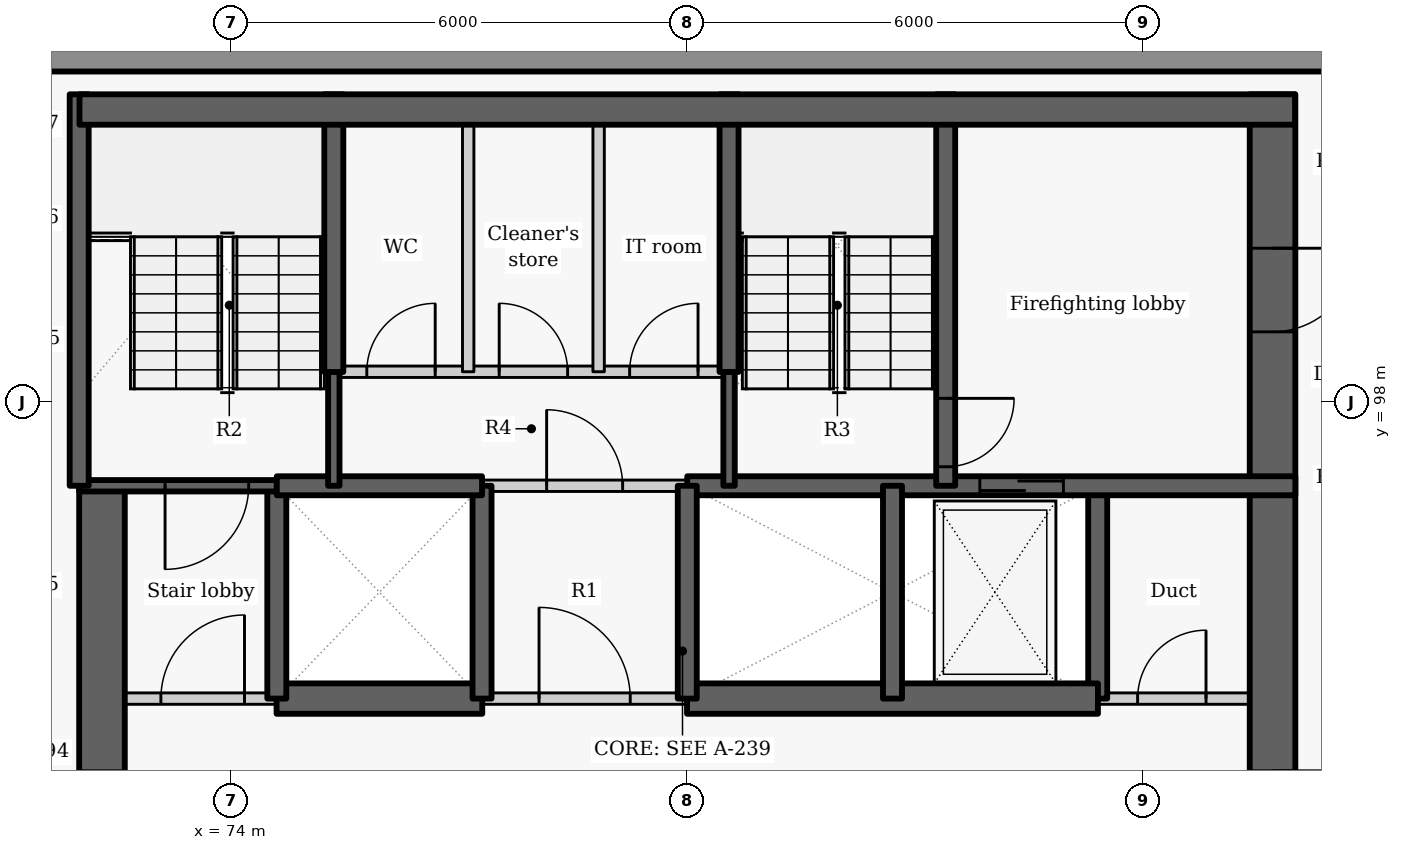
"""IFC4 building model, lengths in metres.
Left out: names, types, materials, properties, quantities, classifications, styles, units other than length and angle.
Written with IfcOpenShell. Run it as: python <this file> out.ifc"""

import sys

from ifc_helpers import new_model, si_unit, direction, frame, frame_2d, origin, place, context, subcontext, project, spatial, rectangle, extrude, element, fill, save


model = new_model("IFC4")
c1 = context("Model", 3, precision=1e-05, world=origin(), true_north=direction((0.0, 1.0)))
c2 = subcontext(c1, "Body", "Model", "MODEL_VIEW")
j1 = project(units=[si_unit("LENGTHUNIT", "METRE"), si_unit("PLANEANGLEUNIT", "RADIAN")], contexts=[c1])
p1 = place(None, origin())
s1 = spatial("IfcSite", under=j1, at=p1, CompositionType="ELEMENT")
p2 = place(p1, origin())
s2 = spatial("IfcBuilding", under=s1, at=p2, CompositionType="ELEMENT")
p3 = place(p2, frame((0.0, 0.0, 226.2)))
s3 = spatial("IfcBuildingStorey", under=s2, at=p3, CompositionType="ELEMENT", Elevation=226.2)
p4 = place(p3, frame((89.499, 102.5, 0.0), z_axis=(0.0, 0.0, 1.0), x_axis=(-1.0, 0.0, 0.0)))
e1 = element("IfcWall", 1, at=p4, inside=s3, PredefinedType="SOLIDWALL", context=c2, shape_type="SweptSolid", body=[
    extrude(rectangle(XDim=19.033, YDim=0.3, at=frame_2d((9.517, 0.0))), origin(), (0.0, 0.0, 1.0), 2.425),
])
p5 = place(p3, frame((72.3, 87.8, -0.41), z_axis=(0.0, 0.0, 1.0), x_axis=(0.0, 1.0, 0.0)))
e2 = element("IfcWall", 2, at=p5, inside=s3, PredefinedType="SHEAR", context=c2, shape_type="SweptSolid", body=[
    extrude(rectangle(XDim=9.1, YDim=0.6, at=frame_2d((4.55, 0.0))), origin(), (0.0, 0.0, 1.0), 3.435),
])
p6 = place(p5, frame((3.85, 0.0, 0.41)))
e3 = element("IfcOpeningElement", 3, at=p6, cuts=e2, PredefinedType="OPENING", context=c2, shape_type="SweptSolid", body=[
    extrude(rectangle(XDim=1.5, YDim=2.1, at=frame_2d((0.75, 1.05))), frame((0.0, 0.31, 0.0), z_axis=(0.0, -1.0, 0.0), x_axis=(1.0, 0.0, 0.0)), (0.0, 0.0, 1.0), 0.62),
])
p7 = place(p3, frame((85.4, 94.1, -0.41), z_axis=(0.0, 0.0, 1.0), x_axis=(0.0, 1.0, 0.0)))
e4 = element("IfcWall", 4, at=p7, inside=s3, PredefinedType="SHEAR", context=c2, shape_type="SweptSolid", body=[
    extrude(rectangle(XDim=2.8, YDim=0.25, at=frame_2d((1.4, 0.0))), origin(), (0.0, 0.0, 1.0), 3.435),
])
p8 = place(p3, frame((87.7, 102.05, -0.41), z_axis=(0.0, 0.0, 1.0), x_axis=(0.0, -1.0, 0.0)))
e5 = element("IfcWall", 5, at=p8, inside=s3, PredefinedType="SHEAR", context=c2, shape_type="SweptSolid", body=[
    extrude(rectangle(XDim=14.25, YDim=0.6, at=frame_2d((7.125, 0.0))), origin(), (0.0, 0.0, 1.0), 3.435),
])
p9 = place(p8, frame((8.9, 0.0, 0.41)))
e6 = element("IfcOpeningElement", 6, at=p9, cuts=e5, PredefinedType="OPENING", context=c2, shape_type="SweptSolid", body=[
    extrude(rectangle(XDim=1.5, YDim=2.1, at=frame_2d((0.75, 1.05))), frame((0.0, 0.31, 0.0), z_axis=(0.0, -1.0, 0.0), x_axis=(1.0, 0.0, 0.0)), (0.0, 0.0, 1.0), 0.62),
])
p10 = place(p8, frame((2.025, 0.0, 0.41)))
e7 = element("IfcOpeningElement", 7, at=p10, cuts=e5, PredefinedType="OPENING", context=c2, shape_type="SweptSolid", body=[
    extrude(rectangle(XDim=1.1, YDim=2.1, at=frame_2d((0.55, 1.05))), frame((0.0, 0.31, 0.0), z_axis=(0.0, -1.0, 0.0), x_axis=(1.0, 0.0, 0.0)), (0.0, 0.0, 1.0), 0.62),
])
p11 = place(p3, frame((72.0, 94.1, 0.0), z_axis=(0.0, 0.0, 1.0), x_axis=(1.0, 0.0, 0.0)))
e8 = element("IfcWall", 8, at=p11, inside=s3, PredefinedType="PARTITIONING", context=c2, shape_type="SweptSolid", body=[
    extrude(rectangle(XDim=2.603, YDim=0.15, at=frame_2d((1.302, 0.0))), origin(), (0.0, 0.0, 1.0), 3.025),
])
p12 = place(p11, frame((1.075, 0.0, 0.0)))
e9 = element("IfcOpeningElement", 9, at=p12, cuts=e8, PredefinedType="OPENING", context=c2, shape_type="SweptSolid", body=[
    extrude(rectangle(XDim=1.1, YDim=2.1, at=frame_2d((0.55, 1.05))), frame((0.0, 0.085, 0.0), z_axis=(0.0, -1.0, 0.0), x_axis=(1.0, 0.0, 0.0)), (0.0, 0.0, 1.0), 0.17),
])
p13 = place(p3, frame((77.297, 94.1, 0.0), z_axis=(0.0, 0.0, 1.0), x_axis=(1.0, 0.0, 0.0)))
e10 = element("IfcWall", 10, at=p13, inside=s3, PredefinedType="PARTITIONING", context=c2, shape_type="SweptSolid", body=[
    extrude(rectangle(XDim=2.706, YDim=0.15, at=frame_2d((1.353, 0.0))), origin(), (0.0, 0.0, 1.0), 3.025),
])
p14 = place(p13, frame((0.753, 0.0, 0.0)))
e11 = element("IfcOpeningElement", 11, at=p14, cuts=e10, PredefinedType="OPENING", context=c2, shape_type="SweptSolid", body=[
    extrude(rectangle(XDim=1.2, YDim=2.1, at=frame_2d((0.6, 1.05))), frame((0.0, 0.085, 0.0), z_axis=(0.0, -1.0, 0.0), x_axis=(1.0, 0.0, 0.0)), (0.0, 0.0, 1.0), 0.17),
])
p15 = place(p3, frame((85.397, 94.1, 0.0), z_axis=(0.0, 0.0, 1.0), x_axis=(1.0, 0.0, 0.0)))
e12 = element("IfcWall", 12, at=p15, inside=s3, PredefinedType="PARTITIONING", context=c2, shape_type="SweptSolid", body=[
    extrude(rectangle(XDim=2.603, YDim=0.15, at=frame_2d((1.302, 0.0))), origin(), (0.0, 0.0, 1.0), 3.025),
])
p16 = place(p15, frame((0.528, 0.0, 0.0)))
e13 = element("IfcOpeningElement", 13, at=p16, cuts=e12, PredefinedType="OPENING", context=c2, shape_type="SweptSolid", body=[
    extrude(rectangle(XDim=0.9, YDim=2.1, at=frame_2d((0.45, 1.05))), frame((0.0, 0.085, 0.0), z_axis=(0.0, -1.0, 0.0), x_axis=(1.0, 0.0, 0.0)), (0.0, 0.0, 1.0), 0.17),
])
p17 = place(p3, frame((74.597, 94.1, -0.41), z_axis=(0.0, 0.0, 1.0), x_axis=(1.0, 0.0, 0.0)))
e14 = element("IfcWall", 14, at=p17, inside=s3, PredefinedType="SHEAR", context=c2, shape_type="SweptSolid", body=[
    extrude(rectangle(XDim=2.706, YDim=0.4, at=frame_2d((1.353, 0.0))), origin(), (0.0, 0.0, 1.0), 3.435),
])
p18 = place(p3, frame((79.997, 94.1, -0.41), z_axis=(0.0, 0.0, 1.0), x_axis=(1.0, 0.0, 0.0)))
e15 = element("IfcWall", 15, at=p18, inside=s3, PredefinedType="SHEAR", context=c2, shape_type="SweptSolid", body=[
    extrude(rectangle(XDim=5.406, YDim=0.4, at=frame_2d((2.703, 0.0))), origin(), (0.0, 0.0, 1.0), 3.435),
])
p19 = place(p3, frame((74.6, 94.1, -0.41), z_axis=(0.0, 0.0, 1.0), x_axis=(0.0, 1.0, 0.0)))
e16 = element("IfcWall", 16, at=p19, inside=s3, PredefinedType="SHEAR", context=c2, shape_type="SweptSolid", body=[
    extrude(rectangle(XDim=2.8, YDim=0.25, at=frame_2d((1.4, 0.0))), origin(), (0.0, 0.0, 1.0), 3.435),
])
p20 = place(p3, frame((74.6, 96.9, -0.41), z_axis=(0.0, 0.0, 1.0), x_axis=(-1.0, 0.0, 0.0)))
e17 = element("IfcWall", 17, at=p20, inside=s3, PredefinedType="SHEAR", context=c2, shape_type="SweptSolid", body=[
    extrude(rectangle(XDim=2.6, YDim=0.15, at=frame_2d((1.3, 0.0))), origin(), (0.0, 0.0, 1.0), 3.435),
])
p21 = place(p20, frame((0.37, 0.0, 0.41)))
e18 = element("IfcOpeningElement", 18, at=p21, cuts=e17, PredefinedType="OPENING", context=c2, shape_type="SweptSolid", body=[
    extrude(rectangle(XDim=1.1, YDim=2.1, at=frame_2d((0.55, 1.05))), frame((0.0, 0.085, 0.0), z_axis=(0.0, -1.0, 0.0), x_axis=(1.0, 0.0, 0.0)), (0.0, 0.0, 1.0), 0.17),
])
p22 = place(p3, frame((77.3, 94.1, -0.41), z_axis=(0.0, 0.0, 1.0), x_axis=(0.0, 1.0, 0.0)))
e19 = element("IfcWall", 19, at=p22, inside=s3, PredefinedType="SHEAR", context=c2, shape_type="SweptSolid", body=[
    extrude(rectangle(XDim=2.8, YDim=0.25, at=frame_2d((1.4, 0.0))), origin(), (0.0, 0.0, 1.0), 3.435),
])
p23 = place(p3, frame((74.6, 96.9, -0.41), z_axis=(0.0, 0.0, 1.0), x_axis=(1.0, 0.0, 0.0)))
e20 = element("IfcWall", 20, at=p23, inside=s3, PredefinedType="SHEAR", context=c2, shape_type="SweptSolid", body=[
    extrude(rectangle(XDim=2.7, YDim=0.25, at=frame_2d((1.35, 0.0))), origin(), (0.0, 0.0, 1.0), 3.435),
])
p24 = place(p3, frame((80.0, 96.9, -0.41), z_axis=(0.0, 0.0, 1.0), x_axis=(1.0, 0.0, 0.0)))
e21 = element("IfcWall", 21, at=p24, inside=s3, PredefinedType="SHEAR", context=c2, shape_type="SweptSolid", body=[
    extrude(rectangle(XDim=8.0, YDim=0.25, at=frame_2d((4.0, 0.0))), origin(), (0.0, 0.0, 1.0), 3.435),
])
p25 = place(p24, frame((3.849, 0.0, 0.41)))
e22 = element("IfcOpeningElement", 22, at=p25, cuts=e21, PredefinedType="OPENING", context=c2, shape_type="SweptSolid", body=[
    extrude(rectangle(XDim=1.1, YDim=2.1, at=frame_2d((0.55, 1.05))), frame((0.0, 0.135, 0.0), z_axis=(0.0, -1.0, 0.0), x_axis=(1.0, 0.0, 0.0)), (0.0, 0.0, 1.0), 0.27),
])
p26 = place(p3, frame((80.0, 94.1, -0.41), z_axis=(0.0, 0.0, 1.0), x_axis=(0.0, 1.0, 0.0)))
e23 = element("IfcWall", 23, at=p26, inside=s3, PredefinedType="SHEAR", context=c2, shape_type="SweptSolid", body=[
    extrude(rectangle(XDim=2.8, YDim=0.25, at=frame_2d((1.4, 0.0))), origin(), (0.0, 0.0, 1.0), 3.435),
])
p27 = place(p3, frame((77.3, 96.9, 0.0), z_axis=(0.0, 0.0, 1.0), x_axis=(1.0, 0.0, 0.0)))
e24 = element("IfcWall", 24, at=p27, inside=s3, PredefinedType="PARTITIONING", context=c2, shape_type="SweptSolid", body=[
    extrude(rectangle(XDim=2.7, YDim=0.15, at=frame_2d((1.35, 0.0))), origin(), (0.0, 0.0, 1.0), 3.025),
])
p28 = place(p27, frame((0.85, 0.0, 0.0)))
e25 = element("IfcOpeningElement", 25, at=p28, cuts=e24, PredefinedType="OPENING", context=c2, shape_type="SweptSolid", body=[
    extrude(rectangle(XDim=1.0, YDim=2.1, at=frame_2d((0.5, 1.05))), frame((0.0, 0.085, 0.0), z_axis=(0.0, -1.0, 0.0), x_axis=(1.0, 0.0, 0.0)), (0.0, 0.0, 1.0), 0.17),
])
p29 = place(p3, frame((82.7, 94.1, -0.41), z_axis=(0.0, 0.0, 1.0), x_axis=(0.0, 1.0, 0.0)))
e26 = element("IfcWall", 26, at=p29, inside=s3, PredefinedType="SHEAR", context=c2, shape_type="SweptSolid", body=[
    extrude(rectangle(XDim=2.8, YDim=0.25, at=frame_2d((1.4, 0.0))), origin(), (0.0, 0.0, 1.0), 3.435),
])
p30 = place(p3, frame((75.35, 96.9, -0.41), z_axis=(0.0, 0.0, 1.0), x_axis=(0.0, 1.0, 0.0)))
e27 = element("IfcWall", 27, at=p30, inside=s3, PredefinedType="SHEAR", context=c2, shape_type="SweptSolid", body=[
    extrude(rectangle(XDim=1.503, YDim=0.15, at=frame_2d((0.751, 0.0))), origin(), (0.0, 0.0, 1.0), 3.435),
])
p31 = place(p3, frame((75.35, 98.397, -0.41), z_axis=(0.0, 0.0, 1.0), x_axis=(0.0, 1.0, 0.0)))
e28 = element("IfcWall", 28, at=p31, inside=s3, PredefinedType="SHEAR", context=c2, shape_type="SweptSolid", body=[
    extrude(rectangle(XDim=3.653, YDim=0.25, at=frame_2d((1.827, 0.0))), origin(), (0.0, 0.0, 1.0), 3.435),
])
p32 = place(p3, frame((72.0, 96.9, -0.41), z_axis=(0.0, 0.0, 1.0), x_axis=(0.0, 1.0, 0.0)))
e29 = element("IfcWall", 29, at=p32, inside=s3, PredefinedType="SHEAR", context=c2, shape_type="SweptSolid", body=[
    extrude(rectangle(XDim=5.15, YDim=0.25, at=frame_2d((2.575, 0.0))), origin(), (0.0, 0.0, 1.0), 3.435),
])
p33 = place(p3, frame((83.4, 102.05, -0.41), z_axis=(0.0, 0.0, 1.0), x_axis=(0.0, -1.0, 0.0)))
e30 = element("IfcWall", 30, at=p33, inside=s3, PredefinedType="SHEAR", context=c2, shape_type="SweptSolid", body=[
    extrude(rectangle(XDim=5.15, YDim=0.25, at=frame_2d((2.575, 0.0))), origin(), (0.0, 0.0, 1.0), 3.435),
])
p34 = place(p33, frame((4.0, 0.0, 0.41)))
e31 = element("IfcOpeningElement", 31, at=p34, cuts=e30, PredefinedType="OPENING", context=c2, shape_type="SweptSolid", body=[
    extrude(rectangle(XDim=0.9, YDim=2.1, at=frame_2d((0.45, 1.05))), frame((0.0, 0.135, 0.0), z_axis=(0.0, -1.0, 0.0), x_axis=(1.0, 0.0, 0.0)), (0.0, 0.0, 1.0), 0.27),
])
p35 = place(p3, frame((80.55, 96.9, -0.41), z_axis=(0.0, 0.0, 1.0), x_axis=(0.0, 1.0, 0.0)))
e32 = element("IfcWall", 32, at=p35, inside=s3, PredefinedType="SHEAR", context=c2, shape_type="SweptSolid", body=[
    extrude(rectangle(XDim=1.503, YDim=0.15, at=frame_2d((0.751, 0.0))), origin(), (0.0, 0.0, 1.0), 3.435),
])
p36 = place(p3, frame((80.55, 98.397, -0.41), z_axis=(0.0, 0.0, 1.0), x_axis=(0.0, 1.0, 0.0)))
e33 = element("IfcWall", 33, at=p36, inside=s3, PredefinedType="SHEAR", context=c2, shape_type="SweptSolid", body=[
    extrude(rectangle(XDim=3.653, YDim=0.25, at=frame_2d((1.827, 0.0))), origin(), (0.0, 0.0, 1.0), 3.435),
])
p37 = place(p3, frame((75.35, 98.4, 0.0), z_axis=(0.0, 0.0, 1.0), x_axis=(1.0, 0.0, 0.0)))
e34 = element("IfcWall", 34, at=p37, inside=s3, PredefinedType="PARTITIONING", context=c2, shape_type="SweptSolid", body=[
    extrude(rectangle(XDim=5.2, YDim=0.15, at=frame_2d((2.6, 0.0))), origin(), (0.0, 0.0, 1.0), 3.025),
])
p38 = place(p37, frame((0.434, 0.0, 0.0)))
e35 = element("IfcOpeningElement", 35, at=p38, cuts=e34, PredefinedType="OPENING", context=c2, shape_type="SweptSolid", body=[
    extrude(rectangle(XDim=0.9, YDim=2.1, at=frame_2d((0.45, 1.05))), frame((0.0, 0.085, 0.0), z_axis=(0.0, -1.0, 0.0), x_axis=(1.0, 0.0, 0.0)), (0.0, 0.0, 1.0), 0.17),
])
p39 = place(p37, frame((2.176, 0.0, 0.0)))
e36 = element("IfcOpeningElement", 36, at=p39, cuts=e34, PredefinedType="OPENING", context=c2, shape_type="SweptSolid", body=[
    extrude(rectangle(XDim=0.9, YDim=2.1, at=frame_2d((0.45, 1.05))), frame((0.0, 0.085, 0.0), z_axis=(0.0, -1.0, 0.0), x_axis=(1.0, 0.0, 0.0)), (0.0, 0.0, 1.0), 0.17),
])
p40 = place(p37, frame((3.892, 0.0, 0.0)))
e37 = element("IfcOpeningElement", 37, at=p40, cuts=e34, PredefinedType="OPENING", context=c2, shape_type="SweptSolid", body=[
    extrude(rectangle(XDim=0.9, YDim=2.1, at=frame_2d((0.45, 1.05))), frame((0.0, 0.085, 0.0), z_axis=(0.0, -1.0, 0.0), x_axis=(1.0, 0.0, 0.0)), (0.0, 0.0, 1.0), 0.17),
])
for number, where, z_axis, x_axis in (
    (38, (77.118, 98.4, 0.0), (0.0, 0.0, 1.0), (0.0, 1.0, 0.0)),
    (39, (78.834, 98.4, 0.0), (0.0, 0.0, 1.0), (0.0, 1.0, 0.0)),
):
    element("IfcWall", number, at=place(p3, frame(where, z_axis=z_axis, x_axis=x_axis)), inside=s3, PredefinedType="PARTITIONING", context=c2, shape_type="SweptSolid", body=[
        extrude(rectangle(XDim=3.65, YDim=0.15, at=frame_2d((1.825, 0.0))), origin(), (0.0, 0.0, 1.0), 3.025),
    ])
p41 = place(p3, frame((72.004, 101.85, -0.41), z_axis=(0.0, 0.0, 1.0), x_axis=(1.0, 0.0, 0.0)))
e40 = element("IfcWall", 40, at=p41, inside=s3, PredefinedType="SHEAR", context=c2, shape_type="SweptSolid", body=[
    extrude(rectangle(XDim=15.992, YDim=0.4, at=frame_2d((7.996, 0.0))), origin(), (0.0, 0.0, 1.0), 3.435),
])
p42 = place(p12, origin())
e41 = element("IfcDoor", 41, at=p42, inside=s3, OperationType="SINGLE_SWING_RIGHT", PredefinedType="DOOR", context=c2, shape_type="SweptSolid", body=[
    extrude(rectangle(XDim=1.1, YDim=2.1, at=frame_2d((0.55, 1.05))), frame((0.0, 0.025, 0.0), z_axis=(0.0, -1.0, 0.0), x_axis=(1.0, 0.0, 0.0)), (0.0, 0.0, 1.0), 0.05),
])
fill(e9, e41)
p43 = place(p14, origin())
e42 = element("IfcDoor", 42, at=p43, inside=s3, OperationType="DOUBLE_DOOR_SINGLE_SWING", PredefinedType="DOOR", context=c2, shape_type="SweptSolid", body=[
    extrude(rectangle(XDim=1.2, YDim=2.1, at=frame_2d((0.6, 1.05))), frame((0.0, 0.025, 0.0), z_axis=(0.0, -1.0, 0.0), x_axis=(1.0, 0.0, 0.0)), (0.0, 0.0, 1.0), 0.05),
])
fill(e11, e42)
p44 = place(p25, origin())
e43 = element("IfcDoor", 43, at=p44, inside=s3, OperationType="SLIDING_TO_LEFT", PredefinedType="DOOR", context=c2, shape_type="SweptSolid", body=[
    extrude(rectangle(XDim=1.1, YDim=2.1, at=frame_2d((0.55, 1.05))), frame((0.0, 0.025, 0.0), z_axis=(0.0, -1.0, 0.0), x_axis=(1.0, 0.0, 0.0)), (0.0, 0.0, 1.0), 0.05),
])
fill(e22, e43)
p45 = place(p16, origin())
e44 = element("IfcDoor", 44, at=p45, inside=s3, OperationType="SINGLE_SWING_RIGHT", PredefinedType="DOOR", context=c2, shape_type="SweptSolid", body=[
    extrude(rectangle(XDim=0.9, YDim=2.1, at=frame_2d((0.45, 1.05))), frame((0.0, 0.025, 0.0), z_axis=(0.0, -1.0, 0.0), x_axis=(1.0, 0.0, 0.0)), (0.0, 0.0, 1.0), 0.05),
])
fill(e13, e44)
p46 = place(p28, origin())
e45 = element("IfcDoor", 45, at=p46, inside=s3, OperationType="SINGLE_SWING_LEFT", PredefinedType="DOOR", context=c2, shape_type="SweptSolid", body=[
    extrude(rectangle(XDim=1.0, YDim=2.1, at=frame_2d((0.5, 1.05))), frame((0.0, 0.025, 0.0), z_axis=(0.0, -1.0, 0.0), x_axis=(1.0, 0.0, 0.0)), (0.0, 0.0, 1.0), 0.05),
])
fill(e25, e45)
p47 = place(p38, origin())
e46 = element("IfcDoor", 46, at=p47, inside=s3, OperationType="SINGLE_SWING_RIGHT", PredefinedType="DOOR", context=c2, shape_type="SweptSolid", body=[
    extrude(rectangle(XDim=0.9, YDim=2.1, at=frame_2d((0.45, 1.05))), frame((0.0, 0.025, 0.0), z_axis=(0.0, -1.0, 0.0), x_axis=(1.0, 0.0, 0.0)), (0.0, 0.0, 1.0), 0.05),
])
fill(e35, e46)
p48 = place(p39, origin())
e47 = element("IfcDoor", 47, at=p48, inside=s3, OperationType="SINGLE_SWING_LEFT", PredefinedType="DOOR", context=c2, shape_type="SweptSolid", body=[
    extrude(rectangle(XDim=0.9, YDim=2.1, at=frame_2d((0.45, 1.05))), frame((0.0, 0.025, 0.0), z_axis=(0.0, -1.0, 0.0), x_axis=(1.0, 0.0, 0.0)), (0.0, 0.0, 1.0), 0.05),
])
fill(e36, e47)
p49 = place(p40, origin())
e48 = element("IfcDoor", 48, at=p49, inside=s3, OperationType="SINGLE_SWING_RIGHT", PredefinedType="DOOR", context=c2, shape_type="SweptSolid", body=[
    extrude(rectangle(XDim=0.9, YDim=2.1, at=frame_2d((0.45, 1.05))), frame((0.0, 0.025, 0.0), z_axis=(0.0, -1.0, 0.0), x_axis=(1.0, 0.0, 0.0)), (0.0, 0.0, 1.0), 0.05),
])
fill(e37, e48)
p50 = place(p21, origin())
e49 = element("IfcDoor", 49, at=p50, inside=s3, OperationType="SINGLE_SWING_RIGHT", PredefinedType="DOOR", context=c2, shape_type="SweptSolid", body=[
    extrude(rectangle(XDim=1.1, YDim=2.1, at=frame_2d((0.55, 1.05))), frame((0.0, 0.025, 0.0), z_axis=(0.0, -1.0, 0.0), x_axis=(1.0, 0.0, 0.0)), (0.0, 0.0, 1.0), 0.05),
])
fill(e18, e49)
p51 = place(p34, origin())
e50 = element("IfcDoor", 50, at=p51, inside=s3, OperationType="SINGLE_SWING_LEFT", PredefinedType="DOOR", context=c2, shape_type="SweptSolid", body=[
    extrude(rectangle(XDim=0.9, YDim=2.1, at=frame_2d((0.45, 1.05))), frame((0.0, 0.025, 0.0), z_axis=(0.0, -1.0, 0.0), x_axis=(1.0, 0.0, 0.0)), (0.0, 0.0, 1.0), 0.05),
])
fill(e31, e50)
p52 = place(p9, origin())
e51 = element("IfcDoor", 51, at=p52, inside=s3, OperationType="DOUBLE_DOOR_SINGLE_SWING", PredefinedType="DOOR", context=c2, shape_type="SweptSolid", body=[
    extrude(rectangle(XDim=1.5, YDim=2.1, at=frame_2d((0.75, 1.05))), frame((0.0, 0.025, 0.0), z_axis=(0.0, -1.0, 0.0), x_axis=(1.0, 0.0, 0.0)), (0.0, 0.0, 1.0), 0.05),
])
fill(e6, e51)
p53 = place(p6, origin())
e52 = element("IfcDoor", 52, at=p53, inside=s3, OperationType="DOUBLE_DOOR_SINGLE_SWING", PredefinedType="DOOR", context=c2, shape_type="SweptSolid", body=[
    extrude(rectangle(XDim=1.5, YDim=2.1, at=frame_2d((0.75, 1.05))), frame((0.0, 0.025, 0.0), z_axis=(0.0, -1.0, 0.0), x_axis=(1.0, 0.0, 0.0)), (0.0, 0.0, 1.0), 0.05),
])
fill(e3, e52)
p54 = place(p10, origin())
e53 = element("IfcDoor", 53, at=p54, inside=s3, OperationType="SINGLE_SWING_LEFT", PredefinedType="DOOR", context=c2, shape_type="SweptSolid", body=[
    extrude(rectangle(XDim=1.1, YDim=2.1, at=frame_2d((0.55, 1.05))), frame((0.0, 0.025, 0.0), z_axis=(0.0, -1.0, 0.0), x_axis=(1.0, 0.0, 0.0)), (0.0, 0.0, 1.0), 0.05),
])
fill(e7, e53)
save(model, sys.argv[1])
